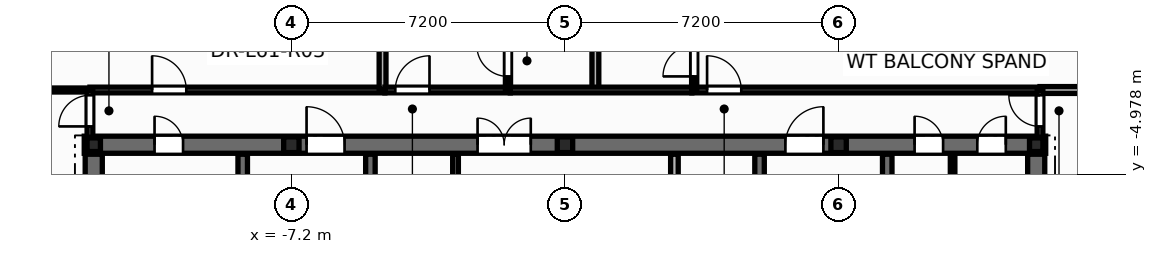
"""IFC4 building model, lengths in metres.
Left out: names, types, materials, properties, quantities, classifications, styles, units other than length and angle.
Written with IfcOpenShell. Run it as: python <this file> out.ifc"""

import sys

from ifc_helpers import new_model, si_unit, direction, frame, frame_2d, origin, origin_2d, place, context, subcontext, project, spatial, rectangle, i_section, extrude, element, fill, save


model = new_model("IFC4")
c1 = context("Model", 3, precision=1e-05, world=origin(), true_north=direction((0.0, 1.0)))
c2 = subcontext(c1, "Body", "Model", "MODEL_VIEW")
j1 = project(units=[si_unit("LENGTHUNIT", "METRE"), si_unit("PLANEANGLEUNIT", "RADIAN")], contexts=[c1])
p1 = place(None, origin())
s1 = spatial("IfcSite", under=j1, at=p1, CompositionType="ELEMENT")
p2 = place(p1, origin())
s2 = spatial("IfcBuilding", under=s1, at=p2, CompositionType="ELEMENT")
p3 = place(p2, frame((0.0, 0.0, 233.4)))
s3 = spatial("IfcBuildingStorey", under=s2, at=p3, CompositionType="ELEMENT", Elevation=233.4)
for number, where, z_axis, x_axis in (
    (1, (12.4, -4.2, 0.0), (0.0, 0.0, 1.0), (1.0, 0.0, 0.0)),
    (2, (-12.4, -4.2, 0.0), (0.0, 0.0, 1.0), (1.0, 0.0, 0.0)),
):
    element("IfcColumn", number, at=place(p3, frame(where, z_axis=z_axis, x_axis=x_axis)), inside=s3, PredefinedType="COLUMN", context=c2, shape_type="SweptSolid", body=[
        extrude(i_section(OverallWidth=0.352, OverallDepth=0.359, WebThickness=0.018, FlangeThickness=0.026, at=origin_2d()), origin(), (0.0, 0.0, 1.0), 3.6),
    ])
for number, where, z_axis, x_axis in (
    (3, (-7.2, -4.2, 0.0), (0.0, 0.0, 1.0), (1.0, 0.0, 0.0)),
    (4, (0.0, -4.2, 0.0), (0.0, 0.0, 1.0), (1.0, 0.0, 0.0)),
    (5, (7.2, -4.2, 0.0), (0.0, 0.0, 1.0), (1.0, 0.0, 0.0)),
):
    element("IfcColumn", number, at=place(p3, frame(where, z_axis=z_axis, x_axis=x_axis)), inside=s3, PredefinedType="PILASTER", context=c2, shape_type="SweptSolid", body=[
        extrude(i_section(OverallWidth=0.405, OverallDepth=0.414, WebThickness=0.022, FlangeThickness=0.032, at=origin_2d()), origin(), (0.0, 0.0, 1.0), 3.6),
    ])
p4 = place(p3, frame((-2.88, -5.6, 0.0), z_axis=(0.0, 0.0, 1.0), x_axis=(0.0, 1.0, 0.0)))
e6 = element("IfcWall", 6, at=p4, inside=s3, PredefinedType="PARTITIONING", context=c2, shape_type="SweptSolid", body=[
    extrude(rectangle(XDim=1.15, YDim=0.15, at=frame_2d((0.575, 0.0))), origin(), (0.0, 0.0, 1.0), 3.345),
])
p5 = place(p3, frame((10.2, -5.52, 0.0), z_axis=(0.0, 0.0, 1.0), x_axis=(0.0, 1.0, 0.0)))
e7 = element("IfcWall", 7, at=p5, inside=s3, PredefinedType="PARTITIONING", context=c2, shape_type="SweptSolid", body=[
    extrude(rectangle(XDim=1.12, YDim=0.12, at=frame_2d((0.56, 0.0))), origin(), (0.0, 0.0, 1.0), 3.345),
])
p6 = place(p3, frame((-12.65, -4.2, 0.0), z_axis=(0.0, 0.0, 1.0), x_axis=(1.0, 0.0, 0.0)))
e8 = element("IfcWall", 8, at=p6, inside=s3, PredefinedType="SHEAR", context=c2, shape_type="SweptSolid", body=[
    extrude(rectangle(XDim=25.3, YDim=0.45, at=frame_2d((12.65, 0.0))), origin(), (0.0, 0.0, 1.0), 3.6),
])
p7 = place(p6, frame((1.85, 0.0, 0.0)))
e9 = element("IfcOpeningElement", 9, at=p7, cuts=e8, PredefinedType="OPENING", context=c2, shape_type="SweptSolid", body=[
    extrude(rectangle(XDim=0.756, YDim=2.054, at=frame_2d((0.375, 1.027))), frame((0.0, 0.235, 0.0), z_axis=(0.0, -1.0, 0.0), x_axis=(1.0, 0.0, 0.0)), (0.0, 0.0, 1.0), 0.47),
])
p8 = place(p6, frame((21.85, 0.0, 0.0)))
e10 = element("IfcOpeningElement", 10, at=p8, cuts=e8, PredefinedType="OPENING", context=c2, shape_type="SweptSolid", body=[
    extrude(rectangle(XDim=0.756, YDim=2.054, at=frame_2d((0.375, 1.027))), frame((0.0, 0.235, 0.0), z_axis=(0.0, -1.0, 0.0), x_axis=(1.0, 0.0, 0.0)), (0.0, 0.0, 1.0), 0.47),
])
p9 = place(p6, frame((23.5, 0.0, 0.0)))
e11 = element("IfcOpeningElement", 11, at=p9, cuts=e8, PredefinedType="OPENING", context=c2, shape_type="SweptSolid", body=[
    extrude(rectangle(XDim=0.756, YDim=2.054, at=frame_2d((0.375, 1.027))), frame((0.0, 0.235, 0.0), z_axis=(0.0, -1.0, 0.0), x_axis=(1.0, 0.0, 0.0)), (0.0, 0.0, 1.0), 0.47),
])
p10 = place(p6, frame((5.85, 0.0, 0.0)))
e12 = element("IfcOpeningElement", 12, at=p10, cuts=e8, PredefinedType="OPENING", context=c2, shape_type="SweptSolid", body=[
    extrude(rectangle(XDim=1.006, YDim=2.104, at=frame_2d((0.5, 1.052))), frame((0.0, 0.235, 0.0), z_axis=(0.0, -1.0, 0.0), x_axis=(1.0, 0.0, 0.0)), (0.0, 0.0, 1.0), 0.47),
])
p11 = place(p6, frame((10.35, 0.0, 0.0)))
e13 = element("IfcOpeningElement", 13, at=p11, cuts=e8, PredefinedType="OPENING", context=c2, shape_type="SweptSolid", body=[
    extrude(rectangle(XDim=1.406, YDim=2.154, at=frame_2d((0.7, 1.077))), frame((0.0, 0.235, 0.0), z_axis=(0.0, -1.0, 0.0), x_axis=(1.0, 0.0, 0.0)), (0.0, 0.0, 1.0), 0.47),
])
p12 = place(p6, frame((18.45, 0.0, 0.0)))
e14 = element("IfcOpeningElement", 14, at=p12, cuts=e8, PredefinedType="OPENING", context=c2, shape_type="SweptSolid", body=[
    extrude(rectangle(XDim=1.006, YDim=2.104, at=frame_2d((0.5, 1.052))), frame((0.0, 0.235, 0.0), z_axis=(0.0, -1.0, 0.0), x_axis=(1.0, 0.0, 0.0)), (0.0, 0.0, 1.0), 0.47),
])
p13 = place(p3, frame((-8.48, -13.85, 0.0), z_axis=(0.0, 0.0, 1.0), x_axis=(0.0, 1.0, 0.0)))
e15 = element("IfcWall", 15, at=p13, inside=s3, PredefinedType="SHEAR", context=c2, shape_type="SweptSolid", body=[
    extrude(rectangle(XDim=9.4, YDim=0.25, at=frame_2d((4.7, 0.0))), origin(), (0.0, 0.0, 1.0), 3.6),
])
p14 = place(p13, frame((6.95, 0.0, 0.0)))
e16 = element("IfcOpeningElement", 16, at=p14, cuts=e15, PredefinedType="OPENING", context=c2, shape_type="SweptSolid", body=[
    extrude(rectangle(XDim=1.006, YDim=2.104, at=frame_2d((0.5, 1.052))), frame((0.0, 0.135, 0.0), z_axis=(0.0, -1.0, 0.0), x_axis=(1.0, 0.0, 0.0)), (0.0, 0.0, 1.0), 0.27),
])
p15 = place(p3, frame((8.48, -13.85, 0.0), z_axis=(0.0, 0.0, 1.0), x_axis=(0.0, 1.0, 0.0)))
e17 = element("IfcWall", 17, at=p15, inside=s3, PredefinedType="SHEAR", context=c2, shape_type="SweptSolid", body=[
    extrude(rectangle(XDim=9.4, YDim=0.25, at=frame_2d((4.7, 0.0))), origin(), (0.0, 0.0, 1.0), 3.6),
])
p16 = place(p15, frame((6.95, 0.0, 0.0)))
e18 = element("IfcOpeningElement", 18, at=p16, cuts=e17, PredefinedType="OPENING", context=c2, shape_type="SweptSolid", body=[
    extrude(rectangle(XDim=1.006, YDim=2.104, at=frame_2d((0.5, 1.052))), frame((0.0, 0.135, 0.0), z_axis=(0.0, -1.0, 0.0), x_axis=(1.0, 0.0, 0.0)), (0.0, 0.0, 1.0), 0.27),
])
for number, where, z_axis, x_axis in (
    (19, (-5.12, -13.85, 0.0), (0.0, 0.0, 1.0), (0.0, 1.0, 0.0)),
    (20, (5.12, -13.85, 0.0), (0.0, 0.0, 1.0), (0.0, 1.0, 0.0)),
):
    element("IfcWall", number, at=place(p3, frame(where, z_axis=z_axis, x_axis=x_axis)), inside=s3, PredefinedType="SHEAR", context=c2, shape_type="SweptSolid", body=[
        extrude(rectangle(XDim=9.4, YDim=0.25, at=frame_2d((4.7, 0.0))), origin(), (0.0, 0.0, 1.0), 3.6),
    ])
for number, where, z_axis, x_axis in (
    (21, (-12.4, -13.85, 0.0), (0.0, 0.0, 1.0), (0.0, 1.0, 0.0)),
    (22, (12.4, -13.85, 0.0), (0.0, 0.0, 1.0), (0.0, 1.0, 0.0)),
):
    element("IfcWall", number, at=place(p3, frame(where, z_axis=z_axis, x_axis=x_axis)), inside=s3, PredefinedType="SHEAR", context=c2, shape_type="SweptSolid", body=[
        extrude(rectangle(XDim=9.4, YDim=0.45, at=frame_2d((4.7, 0.0))), origin(), (0.0, 0.0, 1.0), 3.6),
    ])
p17 = place(p3, frame((2.88, -9.45, 0.0), z_axis=(0.0, 0.0, 1.0), x_axis=(0.0, 1.0, 0.0)))
e23 = element("IfcWall", 23, at=p17, inside=s3, PredefinedType="SOLIDWALL", context=c2, shape_type="SweptSolid", body=[
    extrude(rectangle(XDim=5.0, YDim=0.2, at=frame_2d((2.5, 0.0))), origin(), (0.0, 0.0, 1.0), 3.345),
])
p18 = place(p17, frame((2.05, 0.0, 0.0)))
e24 = element("IfcOpeningElement", 24, at=p18, cuts=e23, PredefinedType="OPENING", context=c2, shape_type="SweptSolid", body=[
    extrude(rectangle(XDim=0.926, YDim=2.104, at=frame_2d((0.46, 1.052))), frame((0.0, 0.11, 0.0), z_axis=(0.0, -1.0, 0.0), x_axis=(1.0, 0.0, 0.0)), (0.0, 0.0, 1.0), 0.22),
])
p19 = place(p3, frame((3.34, -2.76, 0.0), z_axis=(0.0, 0.0, 1.0), x_axis=(1.0, 0.0, 0.0)))
e25 = element("IfcWall", 25, at=p19, inside=s3, PredefinedType="PARTITIONING", context=c2, shape_type="SweptSolid", body=[
    extrude(rectangle(XDim=9.16, YDim=0.15, at=frame_2d((4.58, 0.0))), origin(), (0.0, 0.0, 1.0), 2.32),
])
p20 = place(p19, frame((0.399, 0.0, 0.0)))
e26 = element("IfcOpeningElement", 26, at=p20, cuts=e25, PredefinedType="OPENING", context=c2, shape_type="SweptSolid", body=[
    extrude(rectangle(XDim=0.906, YDim=2.104, at=frame_2d((0.45, 1.052))), frame((0.0, 0.085, 0.0), z_axis=(0.0, -1.0, 0.0), x_axis=(1.0, 0.0, 0.0)), (0.0, 0.0, 1.0), 0.17),
])
p21 = place(p3, frame((-12.5, -2.76, 0.0), z_axis=(0.0, 0.0, 1.0), x_axis=(1.0, 0.0, 0.0)))
e27 = element("IfcWall", 27, at=p21, inside=s3, PredefinedType="PARTITIONING", context=c2, shape_type="SweptSolid", body=[
    extrude(rectangle(XDim=7.76, YDim=0.15, at=frame_2d((3.88, 0.0))), origin(), (0.0, 0.0, 1.0), 2.32),
])
p22 = place(p21, frame((1.635, 0.0, 0.0)))
e28 = element("IfcOpeningElement", 28, at=p22, cuts=e27, PredefinedType="OPENING", context=c2, shape_type="SweptSolid", body=[
    extrude(rectangle(XDim=0.906, YDim=2.104, at=frame_2d((0.45, 1.052))), frame((0.0, 0.085, 0.0), z_axis=(0.0, -1.0, 0.0), x_axis=(1.0, 0.0, 0.0)), (0.0, 0.0, 1.0), 0.17),
])
p23 = place(p3, frame((-4.8, -2.74, 0.0), z_axis=(0.0, 0.0, 1.0), x_axis=(0.0, 1.0, 0.0)))
e29 = element("IfcWall", 29, at=p23, inside=s3, PredefinedType="PARTITIONING", context=c2, shape_type="SweptSolid", body=[
    extrude(rectangle(XDim=13.633, YDim=0.18, at=frame_2d((6.817, 0.0))), origin(), (0.0, 0.0, 1.0), 2.32),
])
p24 = place(p3, frame((0.8, -2.76, 0.0), z_axis=(0.0, 0.0, 1.0), x_axis=(0.0, 1.0, 0.0)))
e30 = element("IfcWall", 30, at=p24, inside=s3, PredefinedType="PARTITIONING", context=c2, shape_type="SweptSolid", body=[
    extrude(rectangle(XDim=16.509, YDim=0.18, at=frame_2d((8.254, 0.0))), origin(), (0.0, 0.0, 1.0), 2.32),
])
p25 = place(p3, frame((-4.738, -2.76, 0.0), z_axis=(0.0, 0.0, 1.0), x_axis=(1.0, 0.0, 0.0)))
e31 = element("IfcWall", 31, at=p25, inside=s3, PredefinedType="PARTITIONING", context=c2, shape_type="SweptSolid", body=[
    extrude(rectangle(XDim=3.298, YDim=0.15, at=frame_2d((1.649, 0.0))), origin(), (0.0, 0.0, 1.0), 2.965),
])
p26 = place(p25, frame((0.273, 0.0, 0.0)))
e32 = element("IfcOpeningElement", 32, at=p26, cuts=e31, PredefinedType="OPENING", context=c2, shape_type="SweptSolid", body=[
    extrude(rectangle(XDim=0.906, YDim=2.104, at=frame_2d((0.45, 1.052))), frame((0.0, 0.085, 0.0), z_axis=(0.0, -1.0, 0.0), x_axis=(1.0, 0.0, 0.0)), (0.0, 0.0, 1.0), 0.17),
])
p27 = place(p3, frame((-1.5, -2.76, 0.0), z_axis=(0.0, 0.0, 1.0), x_axis=(0.0, 1.0, 0.0)))
e33 = element("IfcWall", 33, at=p27, inside=s3, PredefinedType="PARTITIONING", context=c2, shape_type="SweptSolid", body=[
    extrude(rectangle(XDim=2.92, YDim=0.135, at=frame_2d((1.46, 0.0))), origin(), (0.0, 0.0, 1.0), 3.345),
])
p28 = place(p27, frame((0.357, 0.0, 0.0)))
e34 = element("IfcOpeningElement", 34, at=p28, cuts=e33, PredefinedType="OPENING", context=c2, shape_type="SweptSolid", body=[
    extrude(rectangle(XDim=0.826, YDim=2.104, at=frame_2d((0.41, 1.052))), frame((0.0, 0.078, 0.0), z_axis=(0.0, -1.0, 0.0), x_axis=(1.0, 0.0, 0.0)), (0.0, 0.0, 1.0), 0.155),
])
p29 = place(p3, frame((3.4, -2.76, 0.0), z_axis=(0.0, 0.0, 1.0), x_axis=(0.0, 1.0, 0.0)))
e35 = element("IfcWall", 35, at=p29, inside=s3, PredefinedType="PARTITIONING", context=c2, shape_type="SweptSolid", body=[
    extrude(rectangle(XDim=2.92, YDim=0.135, at=frame_2d((1.46, 0.0))), origin(), (0.0, 0.0, 1.0), 3.345),
])
p30 = place(p29, frame((0.357, 0.0, 0.0)))
e36 = element("IfcOpeningElement", 36, at=p30, cuts=e35, PredefinedType="OPENING", context=c2, shape_type="SweptSolid", body=[
    extrude(rectangle(XDim=0.826, YDim=2.104, at=frame_2d((0.41, 1.052))), frame((0.0, 0.078, 0.0), z_axis=(0.0, -1.0, 0.0), x_axis=(1.0, 0.0, 0.0)), (0.0, 0.0, 1.0), 0.155),
])
p31 = place(p3, frame((-1.438, -2.76, 0.0), z_axis=(0.0, 0.0, 1.0), x_axis=(1.0, 0.0, 0.0)))
e37 = element("IfcWall", 37, at=p31, inside=s3, PredefinedType="PARTITIONING", context=c2, shape_type="SweptSolid", body=[
    extrude(rectangle(XDim=4.776, YDim=0.15, at=frame_2d((2.388, 0.0))), origin(), (0.0, 0.0, 1.0), 2.32),
])
p32 = place(p3, frame((-14.588, -2.76, 0.0), z_axis=(0.0, 0.0, 1.0), x_axis=(1.0, 0.0, 0.0)))
e38 = element("IfcWall", 38, at=p32, inside=s3, PredefinedType="PARTITIONING", context=c2, shape_type="SweptSolid", body=[
    extrude(rectangle(XDim=2.088, YDim=0.105, at=frame_2d((1.044, 0.0))), origin(), (0.0, 0.0, 1.0), 2.62),
])
p33 = place(p3, frame((12.5, -2.76, 0.0), z_axis=(0.0, 0.0, 1.0), x_axis=(1.0, 0.0, 0.0)))
e39 = element("IfcWall", 39, at=p33, inside=s3, PredefinedType="PARTITIONING", context=c2, shape_type="SweptSolid", body=[
    extrude(rectangle(XDim=2.088, YDim=0.18, at=frame_2d((1.044, 0.0))), origin(), (0.0, 0.0, 1.0), 2.62),
])
p34 = place(p3, frame((-12.5, -4.24, 0.0), z_axis=(0.0, 0.0, 1.0), x_axis=(0.0, 1.0, 0.0)))
e40 = element("IfcWall", 40, at=p34, inside=s3, PredefinedType="PARTITIONING", context=c2, shape_type="SweptSolid", body=[
    extrude(rectangle(XDim=1.48, YDim=0.15, at=frame_2d((0.74, 0.0))), origin(), (0.0, 0.0, 1.0), 2.32),
])
p35 = place(p34, frame((0.522, 0.0, 0.0)))
e41 = element("IfcOpeningElement", 41, at=p35, cuts=e40, PredefinedType="OPENING", context=c2, shape_type="SweptSolid", body=[
    extrude(rectangle(XDim=0.826, YDim=2.104, at=frame_2d((0.41, 1.052))), frame((0.0, 0.085, 0.0), z_axis=(0.0, -1.0, 0.0), x_axis=(1.0, 0.0, 0.0)), (0.0, 0.0, 1.0), 0.17),
])
p36 = place(p3, frame((12.5, -4.24, 0.0), z_axis=(0.0, 0.0, 1.0), x_axis=(0.0, 1.0, 0.0)))
e42 = element("IfcWall", 42, at=p36, inside=s3, PredefinedType="PARTITIONING", context=c2, shape_type="SweptSolid", body=[
    extrude(rectangle(XDim=1.48, YDim=0.15, at=frame_2d((0.74, 0.0))), origin(), (0.0, 0.0, 1.0), 2.32),
])
p37 = place(p36, frame((0.522, 0.0, 0.0)))
e43 = element("IfcOpeningElement", 43, at=p37, cuts=e42, PredefinedType="OPENING", context=c2, shape_type="SweptSolid", body=[
    extrude(rectangle(XDim=0.826, YDim=2.104, at=frame_2d((0.41, 1.052))), frame((0.0, 0.085, 0.0), z_axis=(0.0, -1.0, 0.0), x_axis=(1.0, 0.0, 0.0)), (0.0, 0.0, 1.0), 0.17),
])
p38 = place(p7, origin())
e44 = element("IfcDoor", 44, at=p38, inside=s3, OperationType="SINGLE_SWING_LEFT", PredefinedType="DOOR", context=c2, shape_type="SweptSolid", body=[
    extrude(rectangle(XDim=0.75, YDim=2.05, at=frame_2d((0.375, 1.025))), frame((0.0, 0.025, 0.0), z_axis=(0.0, -1.0, 0.0), x_axis=(1.0, 0.0, 0.0)), (0.0, 0.0, 1.0), 0.05),
])
fill(e9, e44)
p39 = place(p8, origin())
e45 = element("IfcDoor", 45, at=p39, inside=s3, OperationType="SINGLE_SWING_LEFT", PredefinedType="DOOR", context=c2, shape_type="SweptSolid", body=[
    extrude(rectangle(XDim=0.75, YDim=2.05, at=frame_2d((0.375, 1.025))), frame((0.0, 0.025, 0.0), z_axis=(0.0, -1.0, 0.0), x_axis=(1.0, 0.0, 0.0)), (0.0, 0.0, 1.0), 0.05),
])
fill(e10, e45)
p40 = place(p9, origin())
e46 = element("IfcDoor", 46, at=p40, inside=s3, OperationType="SINGLE_SWING_RIGHT", PredefinedType="DOOR", context=c2, shape_type="SweptSolid", body=[
    extrude(rectangle(XDim=0.75, YDim=2.05, at=frame_2d((0.375, 1.025))), frame((0.0, 0.025, 0.0), z_axis=(0.0, -1.0, 0.0), x_axis=(1.0, 0.0, 0.0)), (0.0, 0.0, 1.0), 0.05),
])
fill(e11, e46)
p41 = place(p10, origin())
e47 = element("IfcDoor", 47, at=p41, inside=s3, OperationType="SINGLE_SWING_LEFT", PredefinedType="DOOR", context=c2, shape_type="SweptSolid", body=[
    extrude(rectangle(XDim=1.0, YDim=2.1, at=frame_2d((0.5, 1.05))), frame((0.0, 0.025, 0.0), z_axis=(0.0, -1.0, 0.0), x_axis=(1.0, 0.0, 0.0)), (0.0, 0.0, 1.0), 0.05),
])
fill(e12, e47)
p42 = place(p11, origin())
e48 = element("IfcDoor", 48, at=p42, inside=s3, OperationType="DOUBLE_DOOR_SINGLE_SWING", PredefinedType="DOOR", context=c2, shape_type="SweptSolid", body=[
    extrude(rectangle(XDim=1.4, YDim=2.15, at=frame_2d((0.7, 1.075))), frame((0.0, 0.025, 0.0), z_axis=(0.0, -1.0, 0.0), x_axis=(1.0, 0.0, 0.0)), (0.0, 0.0, 1.0), 0.05),
])
fill(e13, e48)
p43 = place(p12, origin())
e49 = element("IfcDoor", 49, at=p43, inside=s3, OperationType="SINGLE_SWING_RIGHT", PredefinedType="DOOR", context=c2, shape_type="SweptSolid", body=[
    extrude(rectangle(XDim=1.0, YDim=2.1, at=frame_2d((0.5, 1.05))), frame((0.0, 0.025, 0.0), z_axis=(0.0, -1.0, 0.0), x_axis=(1.0, 0.0, 0.0)), (0.0, 0.0, 1.0), 0.05),
])
fill(e14, e49)
p44 = place(p35, origin())
e50 = element("IfcDoor", 50, at=p44, inside=s3, OperationType="SINGLE_SWING_LEFT", PredefinedType="DOOR", context=c2, shape_type="SweptSolid", body=[
    extrude(rectangle(XDim=0.82, YDim=2.1, at=frame_2d((0.41, 1.05))), frame((0.0, 0.025, 0.0), z_axis=(0.0, -1.0, 0.0), x_axis=(1.0, 0.0, 0.0)), (0.0, 0.0, 1.0), 0.05),
])
fill(e41, e50)
p45 = place(p37, origin())
e51 = element("IfcDoor", 51, at=p45, inside=s3, OperationType="SINGLE_SWING_RIGHT", PredefinedType="DOOR", context=c2, shape_type="SweptSolid", body=[
    extrude(rectangle(XDim=0.82, YDim=2.1, at=frame_2d((0.41, 1.05))), frame((0.0, 0.025, 0.0), z_axis=(0.0, -1.0, 0.0), x_axis=(1.0, 0.0, 0.0)), (0.0, 0.0, 1.0), 0.05),
])
fill(e43, e51)
p46 = place(p22, origin())
e52 = element("IfcDoor", 52, at=p46, inside=s3, OperationType="SINGLE_SWING_LEFT", PredefinedType="DOOR", context=c2, shape_type="SweptSolid", body=[
    extrude(rectangle(XDim=0.9, YDim=2.1, at=frame_2d((0.45, 1.05))), frame((0.0, 0.025, 0.0), z_axis=(0.0, -1.0, 0.0), x_axis=(1.0, 0.0, 0.0)), (0.0, 0.0, 1.0), 0.05),
])
fill(e28, e52)
p47 = place(p28, origin())
e53 = element("IfcDoor", 53, at=p47, inside=s3, OperationType="SINGLE_SWING_RIGHT", PredefinedType="DOOR", context=c2, shape_type="SweptSolid", body=[
    extrude(rectangle(XDim=0.82, YDim=2.1, at=frame_2d((0.41, 1.05))), frame((0.0, 0.025, 0.0), z_axis=(0.0, -1.0, 0.0), x_axis=(1.0, 0.0, 0.0)), (0.0, 0.0, 1.0), 0.05),
])
fill(e34, e53)
p48 = place(p26, origin())
e54 = element("IfcDoor", 54, at=p48, inside=s3, OperationType="SINGLE_SWING_RIGHT", PredefinedType="DOOR", context=c2, shape_type="SweptSolid", body=[
    extrude(rectangle(XDim=0.9, YDim=2.1, at=frame_2d((0.45, 1.05))), frame((0.0, 0.025, 0.0), z_axis=(0.0, -1.0, 0.0), x_axis=(1.0, 0.0, 0.0)), (0.0, 0.0, 1.0), 0.05),
])
fill(e32, e54)
p49 = place(p30, origin())
e55 = element("IfcDoor", 55, at=p49, inside=s3, OperationType="SINGLE_SWING_LEFT", PredefinedType="DOOR", context=c2, shape_type="SweptSolid", body=[
    extrude(rectangle(XDim=0.82, YDim=2.1, at=frame_2d((0.41, 1.05))), frame((0.0, 0.025, 0.0), z_axis=(0.0, -1.0, 0.0), x_axis=(1.0, 0.0, 0.0)), (0.0, 0.0, 1.0), 0.05),
])
fill(e36, e55)
p50 = place(p20, origin())
e56 = element("IfcDoor", 56, at=p50, inside=s3, OperationType="SINGLE_SWING_LEFT", PredefinedType="DOOR", context=c2, shape_type="SweptSolid", body=[
    extrude(rectangle(XDim=0.9, YDim=2.1, at=frame_2d((0.45, 1.05))), frame((0.0, 0.025, 0.0), z_axis=(0.0, -1.0, 0.0), x_axis=(1.0, 0.0, 0.0)), (0.0, 0.0, 1.0), 0.05),
])
fill(e26, e56)
save(model, sys.argv[1])
